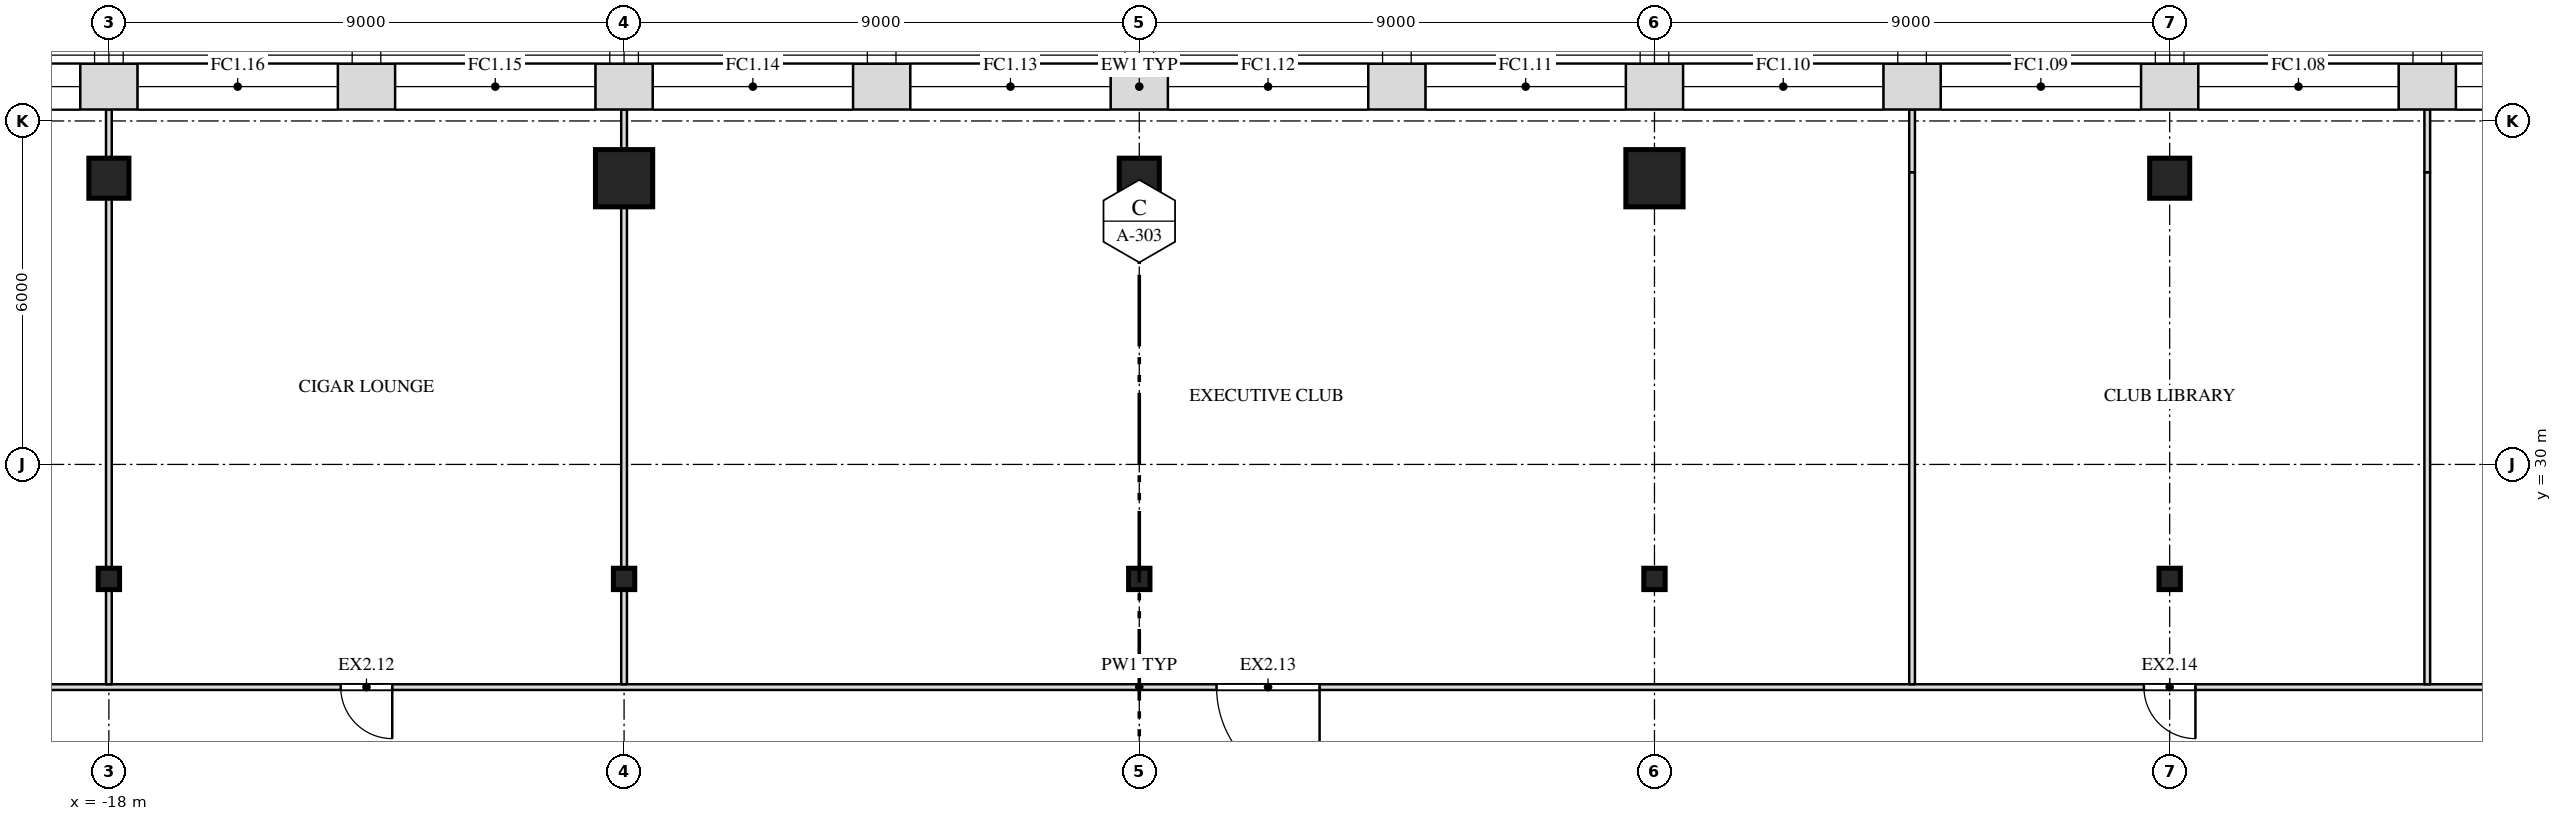
"""IFC4 building model, lengths in metres.
Left out: names, types, materials, properties, quantities, classifications, styles, units other than length and angle.
Written with IfcOpenShell. Run it as: python <this file> out.ifc"""

import sys

from ifc_helpers import new_model, si_unit, direction, frame, frame_2d, origin, origin_2d, place, context, subcontext, project, spatial, rectangle, i_section, extrude, element, fill, save


model = new_model("IFC4")
c1 = context("Model", 3, precision=1e-05, world=origin(), true_north=direction((0.0, 1.0)))
c2 = subcontext(c1, "Body", "Model", "MODEL_VIEW")
j1 = project(units=[si_unit("LENGTHUNIT", "METRE"), si_unit("PLANEANGLEUNIT", "RADIAN")], contexts=[c1])
p1 = place(None, origin())
s1 = spatial("IfcSite", under=j1, at=p1, CompositionType="ELEMENT")
p2 = place(p1, origin())
s2 = spatial("IfcBuilding", under=s1, at=p2, CompositionType="ELEMENT")
p3 = place(p2, frame((0.0, 0.0, 276.5)))
s3 = spatial("IfcBuildingStorey", under=s2, at=p3, CompositionType="ELEMENT", Elevation=276.5)
for number, where, z_axis, x_axis in (
    (1, (-18.0, 28.0, 0.0), (0.0, 0.0, 1.0), (1.0, 0.0, 0.0)),
    (2, (-9.0, 28.0, 0.0), (0.0, 0.0, 1.0), (1.0, 0.0, 0.0)),
    (3, (0.0, 28.0, 0.0), (0.0, 0.0, 1.0), (1.0, 0.0, 0.0)),
    (4, (9.0, 28.0, 0.0), (0.0, 0.0, 1.0), (1.0, 0.0, 0.0)),
    (5, (18.0, 28.0, 0.0), (0.0, 0.0, 1.0), (1.0, 0.0, 0.0)),
):
    element("IfcColumn", number, at=place(p3, frame(where, z_axis=z_axis, x_axis=x_axis)), inside=s3, PredefinedType="COLUMN", context=c2, shape_type="SweptSolid", body=[
        extrude(i_section(OverallWidth=0.373, OverallDepth=0.373, WebThickness=0.016, FlangeThickness=0.026, at=origin_2d()), origin(), (0.0, 0.0, 1.0), 4.0),
    ])
p4 = place(p3, frame((-18.0, 35.0, 0.0), z_axis=(0.0, 0.0, 1.0), x_axis=(1.0, 0.0, 0.0)))
e6 = element("IfcColumn", 6, at=p4, inside=s3, PredefinedType="COLUMN", context=c2, shape_type="SweptSolid", body=[
    extrude(rectangle(XDim=0.7, YDim=0.7, at=origin_2d()), origin(), (0.0, 0.0, 1.0), 4.0),
])
p5 = place(p3, frame((-9.0, 35.0, 0.0), z_axis=(0.0, 0.0, 1.0), x_axis=(1.0, 0.0, 0.0)))
e7 = element("IfcColumn", 7, at=p5, inside=s3, PredefinedType="COLUMN", context=c2, shape_type="SweptSolid", body=[
    extrude(rectangle(XDim=1.0, YDim=1.0, at=origin_2d()), origin(), (0.0, 0.0, 1.0), 4.0),
])
p6 = place(p3, frame((0.0, 35.0, 0.0), z_axis=(0.0, 0.0, 1.0), x_axis=(1.0, 0.0, 0.0)))
e8 = element("IfcColumn", 8, at=p6, inside=s3, PredefinedType="COLUMN", context=c2, shape_type="SweptSolid", body=[
    extrude(rectangle(XDim=0.7, YDim=0.7, at=origin_2d()), origin(), (0.0, 0.0, 1.0), 4.0),
])
p7 = place(p3, frame((9.0, 35.0, 0.0), z_axis=(0.0, 0.0, 1.0), x_axis=(1.0, 0.0, 0.0)))
e9 = element("IfcColumn", 9, at=p7, inside=s3, PredefinedType="COLUMN", context=c2, shape_type="SweptSolid", body=[
    extrude(rectangle(XDim=1.0, YDim=1.0, at=origin_2d()), origin(), (0.0, 0.0, 1.0), 4.0),
])
p8 = place(p3, frame((18.0, 35.0, 0.0), z_axis=(0.0, 0.0, 1.0), x_axis=(1.0, 0.0, 0.0)))
e10 = element("IfcColumn", 10, at=p8, inside=s3, PredefinedType="COLUMN", context=c2, shape_type="SweptSolid", body=[
    extrude(rectangle(XDim=0.7, YDim=0.7, at=origin_2d()), origin(), (0.0, 0.0, 1.0), 4.0),
])
p9 = place(p3, frame((-35.2, 26.11, 0.0), z_axis=(0.0, 0.0, 1.0), x_axis=(1.0, 0.0, 0.0)))
e11 = element("IfcWall", 11, at=p9, inside=s3, PredefinedType="PARTITIONING", context=c2, shape_type="SweptSolid", body=[
    extrude(rectangle(XDim=70.4, YDim=0.1, at=frame_2d((35.2, 0.0))), origin(), (0.0, 0.0, 1.0), 3.78),
])
p10 = place(p9, frame((12.25, 0.0, 0.0)))
e12 = element("IfcOpeningElement", 12, at=p10, cuts=e11, PredefinedType="OPENING", context=c2, shape_type="SweptSolid", body=[
    extrude(rectangle(XDim=0.9, YDim=2.1, at=frame_2d((0.45, 1.05))), frame((0.0, 0.062, 0.0), z_axis=(0.0, -1.0, 0.0), x_axis=(1.0, 0.0, 0.0)), (0.0, 0.0, 1.0), 0.124),
])
p11 = place(p9, frame((21.25, 0.0, 0.0)))
e13 = element("IfcOpeningElement", 13, at=p11, cuts=e11, PredefinedType="OPENING", context=c2, shape_type="SweptSolid", body=[
    extrude(rectangle(XDim=0.9, YDim=2.1, at=frame_2d((0.45, 1.05))), frame((0.0, 0.062, 0.0), z_axis=(0.0, -1.0, 0.0), x_axis=(1.0, 0.0, 0.0)), (0.0, 0.0, 1.0), 0.124),
])
p12 = place(p9, frame((36.55, 0.0, 0.0)))
e14 = element("IfcOpeningElement", 14, at=p12, cuts=e11, PredefinedType="OPENING", context=c2, shape_type="SweptSolid", body=[
    extrude(rectangle(XDim=1.8, YDim=2.1, at=frame_2d((0.9, 1.05))), frame((0.0, 0.062, 0.0), z_axis=(0.0, -1.0, 0.0), x_axis=(1.0, 0.0, 0.0)), (0.0, 0.0, 1.0), 0.124),
])
p13 = place(p9, frame((52.75, 0.0, 0.0)))
e15 = element("IfcOpeningElement", 15, at=p13, cuts=e11, PredefinedType="OPENING", context=c2, shape_type="SweptSolid", body=[
    extrude(rectangle(XDim=0.9, YDim=2.1, at=frame_2d((0.45, 1.05))), frame((0.0, 0.062, 0.0), z_axis=(0.0, -1.0, 0.0), x_axis=(1.0, 0.0, 0.0)), (0.0, 0.0, 1.0), 0.124),
])
p14 = place(p9, frame((59.5, 0.0, 0.0)))
e16 = element("IfcOpeningElement", 16, at=p14, cuts=e11, PredefinedType="OPENING", context=c2, shape_type="SweptSolid", body=[
    extrude(rectangle(XDim=0.9, YDim=2.1, at=frame_2d((0.45, 1.05))), frame((0.0, 0.062, 0.0), z_axis=(0.0, -1.0, 0.0), x_axis=(1.0, 0.0, 0.0)), (0.0, 0.0, 1.0), 0.124),
])
p15 = place(p3, frame((-18.0, 26.16, 0.0), z_axis=(0.0, 0.0, 1.0), x_axis=(0.0, 1.0, 0.0)))
e17 = element("IfcWall", 17, at=p15, inside=s3, PredefinedType="PARTITIONING", context=c2, shape_type="SweptSolid", body=[
    extrude(rectangle(XDim=1.653, YDim=0.1, at=frame_2d((0.827, 0.0))), origin(), (0.0, 0.0, 1.0), 3.247),
])
p16 = place(p3, frame((-18.0, 28.187, 0.0), z_axis=(0.0, 0.0, 1.0), x_axis=(0.0, 1.0, 0.0)))
e18 = element("IfcWall", 18, at=p16, inside=s3, PredefinedType="PARTITIONING", context=c2, shape_type="SweptSolid", body=[
    extrude(rectangle(XDim=6.463, YDim=0.1, at=frame_2d((3.231, 0.0))), origin(), (0.0, 0.0, 1.0), 3.247),
])
p17 = place(p3, frame((-18.0, 35.35, 0.0), z_axis=(0.0, 0.0, 1.0), x_axis=(0.0, 1.0, 0.0)))
e19 = element("IfcWall", 19, at=p17, inside=s3, PredefinedType="PARTITIONING", context=c2, shape_type="SweptSolid", body=[
    extrude(rectangle(XDim=0.85, YDim=0.1, at=frame_2d((0.425, 0.0))), origin(), (0.0, 0.0, 1.0), 3.78),
])
p18 = place(p3, frame((-9.0, 26.16, 0.0), z_axis=(0.0, 0.0, 1.0), x_axis=(0.0, 1.0, 0.0)))
e20 = element("IfcWall", 20, at=p18, inside=s3, PredefinedType="PARTITIONING", context=c2, shape_type="SweptSolid", body=[
    extrude(rectangle(XDim=1.653, YDim=0.1, at=frame_2d((0.827, 0.0))), origin(), (0.0, 0.0, 1.0), 3.247),
])
p19 = place(p3, frame((-9.0, 28.187, 0.0), z_axis=(0.0, 0.0, 1.0), x_axis=(0.0, 1.0, 0.0)))
e21 = element("IfcWall", 21, at=p19, inside=s3, PredefinedType="PARTITIONING", context=c2, shape_type="SweptSolid", body=[
    extrude(rectangle(XDim=6.313, YDim=0.1, at=frame_2d((3.157, 0.0))), origin(), (0.0, 0.0, 1.0), 3.247),
])
p20 = place(p3, frame((-9.0, 35.5, 0.0), z_axis=(0.0, 0.0, 1.0), x_axis=(0.0, 1.0, 0.0)))
e22 = element("IfcWall", 22, at=p20, inside=s3, PredefinedType="PARTITIONING", context=c2, shape_type="SweptSolid", body=[
    extrude(rectangle(XDim=0.7, YDim=0.1, at=frame_2d((0.35, 0.0))), origin(), (0.0, 0.0, 1.0), 3.78),
])
p21 = place(p3, frame((13.5, 26.16, 0.0), z_axis=(0.0, 0.0, 1.0), x_axis=(0.0, 1.0, 0.0)))
e23 = element("IfcWall", 23, at=p21, inside=s3, PredefinedType="PARTITIONING", context=c2, shape_type="SweptSolid", body=[
    extrude(rectangle(XDim=8.945, YDim=0.1, at=frame_2d((4.472, 0.0))), origin(), (0.0, 0.0, 1.0), 3.247),
])
p22 = place(p3, frame((13.5, 35.104, 0.0), z_axis=(0.0, 0.0, 1.0), x_axis=(0.0, 1.0, 0.0)))
e24 = element("IfcWall", 24, at=p22, inside=s3, PredefinedType="PARTITIONING", context=c2, shape_type="SweptSolid", body=[
    extrude(rectangle(XDim=1.095, YDim=0.1, at=frame_2d((0.548, 0.0))), origin(), (0.0, 0.0, 1.0), 3.78),
])
p23 = place(p3, frame((22.5, 26.16, 0.0), z_axis=(0.0, 0.0, 1.0), x_axis=(0.0, 1.0, 0.0)))
e25 = element("IfcWall", 25, at=p23, inside=s3, PredefinedType="PARTITIONING", context=c2, shape_type="SweptSolid", body=[
    extrude(rectangle(XDim=8.945, YDim=0.1, at=frame_2d((4.472, 0.0))), origin(), (0.0, 0.0, 1.0), 3.247),
])
p24 = place(p3, frame((22.5, 35.104, 0.0), z_axis=(0.0, 0.0, 1.0), x_axis=(0.0, 1.0, 0.0)))
e26 = element("IfcWall", 26, at=p24, inside=s3, PredefinedType="PARTITIONING", context=c2, shape_type="SweptSolid", body=[
    extrude(rectangle(XDim=1.095, YDim=0.1, at=frame_2d((0.548, 0.0))), origin(), (0.0, 0.0, 1.0), 3.78),
])
p25 = place(p3, frame((29.948, 36.6, 0.0), z_axis=(0.0, 0.0, 1.0), x_axis=(-1.0, 0.0, 0.0)))
e27 = element("IfcWall", 27, at=p25, inside=s3, PredefinedType="SOLIDWALL", context=c2, shape_type="SweptSolid", body=[
    extrude(rectangle(XDim=59.895, YDim=0.8, at=frame_2d((29.948, 0.0))), origin(), (0.0, 0.0, 1.0), 3.78),
])
p26 = place(p25, frame((3.448, 0.0, 1.0)))
e28 = element("IfcOpeningElement", 28, at=p26, cuts=e27, PredefinedType="OPENING", context=c2, shape_type="SweptSolid", body=[
    extrude(rectangle(XDim=3.5, YDim=2.5, at=frame_2d((1.75, 1.25))), frame((0.0, 0.412, 0.0), z_axis=(0.0, -1.0, 0.0), x_axis=(1.0, 0.0, 0.0)), (0.0, 0.0, 1.0), 0.824),
])
p27 = place(p25, frame((7.948, 0.0, 1.0)))
e29 = element("IfcOpeningElement", 29, at=p27, cuts=e27, PredefinedType="OPENING", context=c2, shape_type="SweptSolid", body=[
    extrude(rectangle(XDim=3.5, YDim=2.5, at=frame_2d((1.75, 1.25))), frame((0.0, 0.412, 0.0), z_axis=(0.0, -1.0, 0.0), x_axis=(1.0, 0.0, 0.0)), (0.0, 0.0, 1.0), 0.824),
])
p28 = place(p25, frame((12.448, 0.0, 1.0)))
e30 = element("IfcOpeningElement", 30, at=p28, cuts=e27, PredefinedType="OPENING", context=c2, shape_type="SweptSolid", body=[
    extrude(rectangle(XDim=3.5, YDim=2.5, at=frame_2d((1.75, 1.25))), frame((0.0, 0.412, 0.0), z_axis=(0.0, -1.0, 0.0), x_axis=(1.0, 0.0, 0.0)), (0.0, 0.0, 1.0), 0.824),
])
p29 = place(p25, frame((16.948, 0.0, 1.0)))
e31 = element("IfcOpeningElement", 31, at=p29, cuts=e27, PredefinedType="OPENING", context=c2, shape_type="SweptSolid", body=[
    extrude(rectangle(XDim=3.5, YDim=2.5, at=frame_2d((1.75, 1.25))), frame((0.0, 0.412, 0.0), z_axis=(0.0, -1.0, 0.0), x_axis=(1.0, 0.0, 0.0)), (0.0, 0.0, 1.0), 0.824),
])
p30 = place(p25, frame((21.448, 0.0, 1.0)))
e32 = element("IfcOpeningElement", 32, at=p30, cuts=e27, PredefinedType="OPENING", context=c2, shape_type="SweptSolid", body=[
    extrude(rectangle(XDim=3.5, YDim=2.5, at=frame_2d((1.75, 1.25))), frame((0.0, 0.412, 0.0), z_axis=(0.0, -1.0, 0.0), x_axis=(1.0, 0.0, 0.0)), (0.0, 0.0, 1.0), 0.824),
])
p31 = place(p25, frame((25.948, 0.0, 1.0)))
e33 = element("IfcOpeningElement", 33, at=p31, cuts=e27, PredefinedType="OPENING", context=c2, shape_type="SweptSolid", body=[
    extrude(rectangle(XDim=3.5, YDim=2.5, at=frame_2d((1.75, 1.25))), frame((0.0, 0.412, 0.0), z_axis=(0.0, -1.0, 0.0), x_axis=(1.0, 0.0, 0.0)), (0.0, 0.0, 1.0), 0.824),
])
p32 = place(p25, frame((30.448, 0.0, 1.0)))
e34 = element("IfcOpeningElement", 34, at=p32, cuts=e27, PredefinedType="OPENING", context=c2, shape_type="SweptSolid", body=[
    extrude(rectangle(XDim=3.5, YDim=2.5, at=frame_2d((1.75, 1.25))), frame((0.0, 0.412, 0.0), z_axis=(0.0, -1.0, 0.0), x_axis=(1.0, 0.0, 0.0)), (0.0, 0.0, 1.0), 0.824),
])
p33 = place(p25, frame((34.948, 0.0, 1.0)))
e35 = element("IfcOpeningElement", 35, at=p33, cuts=e27, PredefinedType="OPENING", context=c2, shape_type="SweptSolid", body=[
    extrude(rectangle(XDim=3.5, YDim=2.5, at=frame_2d((1.75, 1.25))), frame((0.0, 0.412, 0.0), z_axis=(0.0, -1.0, 0.0), x_axis=(1.0, 0.0, 0.0)), (0.0, 0.0, 1.0), 0.824),
])
p34 = place(p25, frame((39.448, 0.0, 1.0)))
e36 = element("IfcOpeningElement", 36, at=p34, cuts=e27, PredefinedType="OPENING", context=c2, shape_type="SweptSolid", body=[
    extrude(rectangle(XDim=3.5, YDim=2.5, at=frame_2d((1.75, 1.25))), frame((0.0, 0.412, 0.0), z_axis=(0.0, -1.0, 0.0), x_axis=(1.0, 0.0, 0.0)), (0.0, 0.0, 1.0), 0.824),
])
p35 = place(p25, frame((43.948, 0.0, 1.0)))
e37 = element("IfcOpeningElement", 37, at=p35, cuts=e27, PredefinedType="OPENING", context=c2, shape_type="SweptSolid", body=[
    extrude(rectangle(XDim=3.5, YDim=2.5, at=frame_2d((1.75, 1.25))), frame((0.0, 0.412, 0.0), z_axis=(0.0, -1.0, 0.0), x_axis=(1.0, 0.0, 0.0)), (0.0, 0.0, 1.0), 0.824),
])
p36 = place(p25, frame((48.448, 0.0, 1.0)))
e38 = element("IfcOpeningElement", 38, at=p36, cuts=e27, PredefinedType="OPENING", context=c2, shape_type="SweptSolid", body=[
    extrude(rectangle(XDim=3.5, YDim=2.5, at=frame_2d((1.75, 1.25))), frame((0.0, 0.412, 0.0), z_axis=(0.0, -1.0, 0.0), x_axis=(1.0, 0.0, 0.0)), (0.0, 0.0, 1.0), 0.824),
])
p37 = place(p25, frame((52.948, 0.0, 1.0)))
e39 = element("IfcOpeningElement", 39, at=p37, cuts=e27, PredefinedType="OPENING", context=c2, shape_type="SweptSolid", body=[
    extrude(rectangle(XDim=3.5, YDim=2.5, at=frame_2d((1.75, 1.25))), frame((0.0, 0.412, 0.0), z_axis=(0.0, -1.0, 0.0), x_axis=(1.0, 0.0, 0.0)), (0.0, 0.0, 1.0), 0.824),
])
p38 = place(p11, origin())
e40 = element("IfcDoor", 40, at=p38, inside=s3, OperationType="SINGLE_SWING_LEFT", PredefinedType="DOOR", context=c2, shape_type="SweptSolid", body=[
    extrude(rectangle(XDim=0.9, YDim=2.1, at=frame_2d((0.45, 1.05))), frame((0.0, 0.025, 0.0), z_axis=(0.0, -1.0, 0.0), x_axis=(1.0, 0.0, 0.0)), (0.0, 0.0, 1.0), 0.05),
])
fill(e13, e40)
p39 = place(p12, origin())
e41 = element("IfcDoor", 41, at=p39, inside=s3, OperationType="DOUBLE_DOOR_SINGLE_SWING", PredefinedType="DOOR", context=c2, shape_type="SweptSolid", body=[
    extrude(rectangle(XDim=1.8, YDim=2.1, at=frame_2d((0.9, 1.05))), frame((0.0, 0.025, 0.0), z_axis=(0.0, -1.0, 0.0), x_axis=(1.0, 0.0, 0.0)), (0.0, 0.0, 1.0), 0.05),
])
fill(e14, e41)
p40 = place(p13, origin())
e42 = element("IfcDoor", 42, at=p40, inside=s3, OperationType="SINGLE_SWING_LEFT", PredefinedType="DOOR", context=c2, shape_type="SweptSolid", body=[
    extrude(rectangle(XDim=0.9, YDim=2.1, at=frame_2d((0.45, 1.05))), frame((0.0, 0.025, 0.0), z_axis=(0.0, -1.0, 0.0), x_axis=(1.0, 0.0, 0.0)), (0.0, 0.0, 1.0), 0.05),
])
fill(e15, e42)
p41 = place(p26, origin())
e43 = element("IfcWindow", 43, at=p41, inside=s3, PartitioningType="SINGLE_PANEL", PredefinedType="WINDOW", context=c2, shape_type="SweptSolid", body=[
    extrude(rectangle(XDim=3.5, YDim=2.5, at=frame_2d((1.75, 1.25))), frame((0.0, 0.03, 0.0), z_axis=(0.0, -1.0, 0.0), x_axis=(1.0, 0.0, 0.0)), (0.0, 0.0, 1.0), 0.06),
])
fill(e28, e43)
p42 = place(p27, origin())
e44 = element("IfcWindow", 44, at=p42, inside=s3, PartitioningType="SINGLE_PANEL", PredefinedType="WINDOW", context=c2, shape_type="SweptSolid", body=[
    extrude(rectangle(XDim=3.5, YDim=2.5, at=frame_2d((1.75, 1.25))), frame((0.0, 0.03, 0.0), z_axis=(0.0, -1.0, 0.0), x_axis=(1.0, 0.0, 0.0)), (0.0, 0.0, 1.0), 0.06),
])
fill(e29, e44)
p43 = place(p28, origin())
e45 = element("IfcWindow", 45, at=p43, inside=s3, PartitioningType="SINGLE_PANEL", PredefinedType="WINDOW", context=c2, shape_type="SweptSolid", body=[
    extrude(rectangle(XDim=3.5, YDim=2.5, at=frame_2d((1.75, 1.25))), frame((0.0, 0.03, 0.0), z_axis=(0.0, -1.0, 0.0), x_axis=(1.0, 0.0, 0.0)), (0.0, 0.0, 1.0), 0.06),
])
fill(e30, e45)
p44 = place(p29, origin())
e46 = element("IfcWindow", 46, at=p44, inside=s3, PartitioningType="SINGLE_PANEL", PredefinedType="WINDOW", context=c2, shape_type="SweptSolid", body=[
    extrude(rectangle(XDim=3.5, YDim=2.5, at=frame_2d((1.75, 1.25))), frame((0.0, 0.03, 0.0), z_axis=(0.0, -1.0, 0.0), x_axis=(1.0, 0.0, 0.0)), (0.0, 0.0, 1.0), 0.06),
])
fill(e31, e46)
p45 = place(p30, origin())
e47 = element("IfcWindow", 47, at=p45, inside=s3, PartitioningType="SINGLE_PANEL", PredefinedType="WINDOW", context=c2, shape_type="SweptSolid", body=[
    extrude(rectangle(XDim=3.5, YDim=2.5, at=frame_2d((1.75, 1.25))), frame((0.0, 0.03, 0.0), z_axis=(0.0, -1.0, 0.0), x_axis=(1.0, 0.0, 0.0)), (0.0, 0.0, 1.0), 0.06),
])
fill(e32, e47)
p46 = place(p31, origin())
e48 = element("IfcWindow", 48, at=p46, inside=s3, PartitioningType="SINGLE_PANEL", PredefinedType="WINDOW", context=c2, shape_type="SweptSolid", body=[
    extrude(rectangle(XDim=3.5, YDim=2.5, at=frame_2d((1.75, 1.25))), frame((0.0, 0.03, 0.0), z_axis=(0.0, -1.0, 0.0), x_axis=(1.0, 0.0, 0.0)), (0.0, 0.0, 1.0), 0.06),
])
fill(e33, e48)
p47 = place(p32, origin())
e49 = element("IfcWindow", 49, at=p47, inside=s3, PartitioningType="SINGLE_PANEL", PredefinedType="WINDOW", context=c2, shape_type="SweptSolid", body=[
    extrude(rectangle(XDim=3.5, YDim=2.5, at=frame_2d((1.75, 1.25))), frame((0.0, 0.03, 0.0), z_axis=(0.0, -1.0, 0.0), x_axis=(1.0, 0.0, 0.0)), (0.0, 0.0, 1.0), 0.06),
])
fill(e34, e49)
p48 = place(p33, origin())
e50 = element("IfcWindow", 50, at=p48, inside=s3, PartitioningType="SINGLE_PANEL", PredefinedType="WINDOW", context=c2, shape_type="SweptSolid", body=[
    extrude(rectangle(XDim=3.5, YDim=2.5, at=frame_2d((1.75, 1.25))), frame((0.0, 0.03, 0.0), z_axis=(0.0, -1.0, 0.0), x_axis=(1.0, 0.0, 0.0)), (0.0, 0.0, 1.0), 0.06),
])
fill(e35, e50)
p49 = place(p34, origin())
e51 = element("IfcWindow", 51, at=p49, inside=s3, PartitioningType="SINGLE_PANEL", PredefinedType="WINDOW", context=c2, shape_type="SweptSolid", body=[
    extrude(rectangle(XDim=3.5, YDim=2.5, at=frame_2d((1.75, 1.25))), frame((0.0, 0.03, 0.0), z_axis=(0.0, -1.0, 0.0), x_axis=(1.0, 0.0, 0.0)), (0.0, 0.0, 1.0), 0.06),
])
fill(e36, e51)
p50 = place(p35, origin())
e52 = element("IfcWindow", 52, at=p50, inside=s3, PartitioningType="SINGLE_PANEL", PredefinedType="WINDOW", context=c2, shape_type="SweptSolid", body=[
    extrude(rectangle(XDim=3.5, YDim=2.5, at=frame_2d((1.75, 1.25))), frame((0.0, 0.03, 0.0), z_axis=(0.0, -1.0, 0.0), x_axis=(1.0, 0.0, 0.0)), (0.0, 0.0, 1.0), 0.06),
])
fill(e37, e52)
p51 = place(p36, origin())
e53 = element("IfcWindow", 53, at=p51, inside=s3, PartitioningType="SINGLE_PANEL", PredefinedType="WINDOW", context=c2, shape_type="SweptSolid", body=[
    extrude(rectangle(XDim=3.5, YDim=2.5, at=frame_2d((1.75, 1.25))), frame((0.0, 0.03, 0.0), z_axis=(0.0, -1.0, 0.0), x_axis=(1.0, 0.0, 0.0)), (0.0, 0.0, 1.0), 0.06),
])
fill(e38, e53)
save(model, sys.argv[1])
